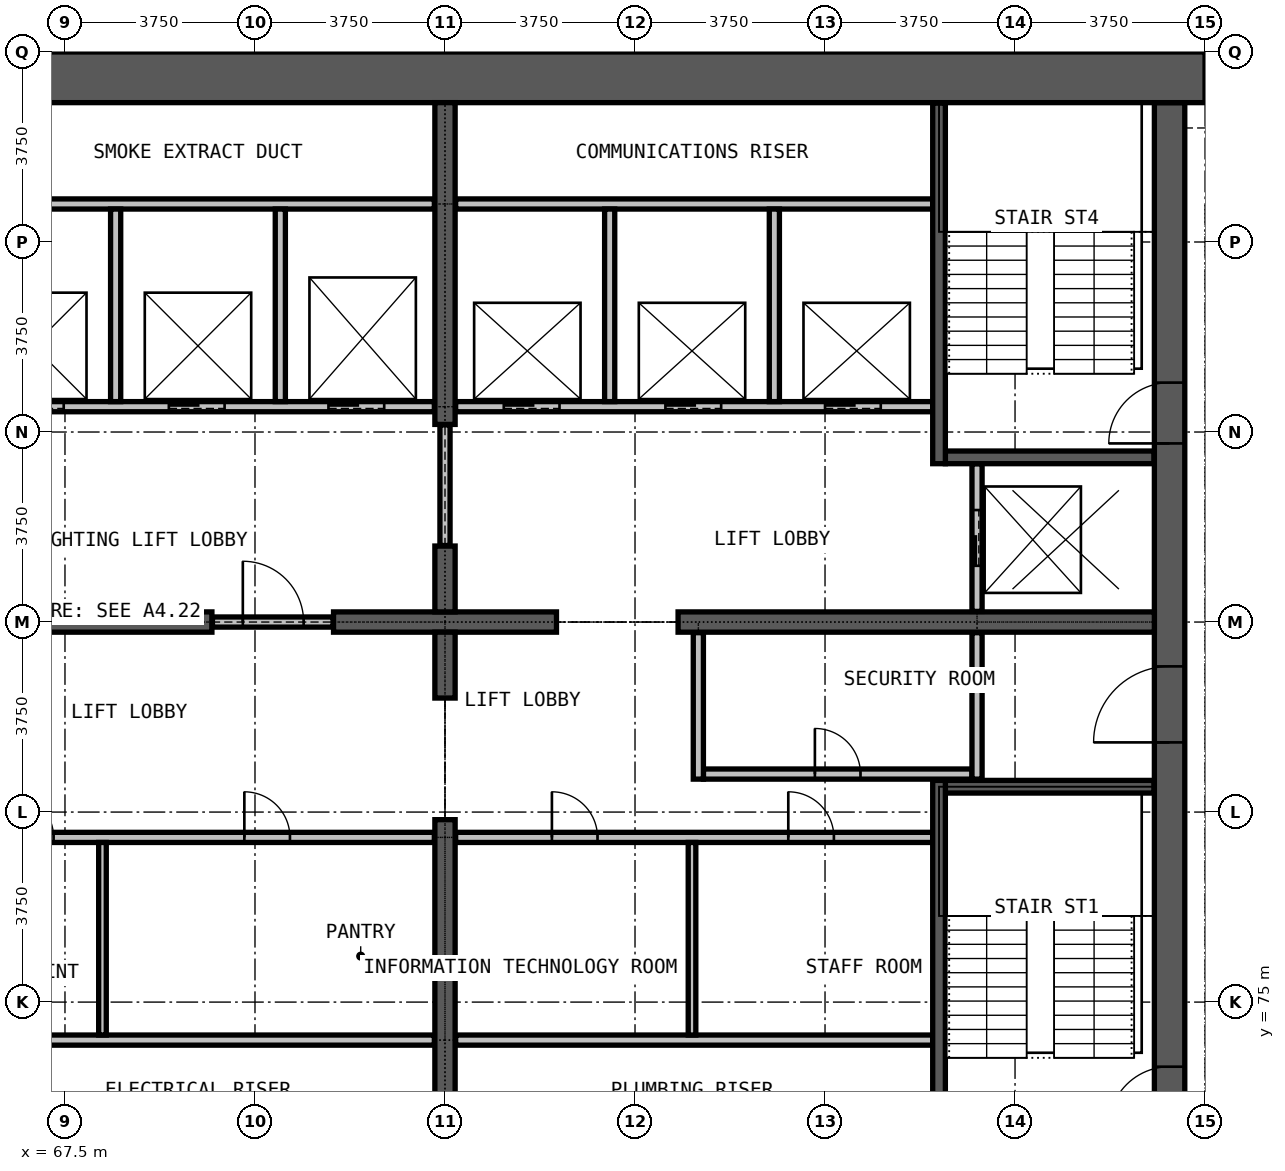
"""IFC4 building model, lengths in metres.
Left out: names, types, materials, properties, quantities, classifications, styles, units other than length and angle.
Written with IfcOpenShell. Run it as: python <this file> out.ifc"""

import sys

from ifc_helpers import new_model, si_unit, direction, frame, frame_2d, origin, place, context, subcontext, project, spatial, rectangle, extrude, element, fill, save


model = new_model("IFC4")
c1 = context("Model", 3, precision=1e-05, world=origin(), true_north=direction((0.0, 1.0)))
c2 = subcontext(c1, "Body", "Model", "MODEL_VIEW")
j1 = project(units=[si_unit("LENGTHUNIT", "METRE"), si_unit("PLANEANGLEUNIT", "RADIAN")], contexts=[c1])
p1 = place(None, origin())
s1 = spatial("IfcSite", under=j1, at=p1, CompositionType="ELEMENT")
p2 = place(p1, origin())
s2 = spatial("IfcBuilding", under=s1, at=p2, CompositionType="ELEMENT")
p3 = place(p2, frame((0.0, 0.0, 221.1)))
s3 = spatial("IfcBuildingStorey", under=s2, at=p3, CompositionType="ELEMENT", Elevation=221.1)
p4 = place(p3, frame((89.3, 72.25, 0.0), z_axis=(0.0, 0.0, 1.0), x_axis=(0.0, 1.0, 0.0)))
e1 = element("IfcWall", 1, at=p4, inside=s3, PredefinedType="SHEAR", context=c2, shape_type="SweptSolid", body=[
    extrude(rectangle(XDim=20.5, YDim=0.6, at=frame_2d((10.25, 0.0))), origin(), (0.0, 0.0, 1.0), 3.6),
])
p5 = place(p4, frame((0.275, 0.0, 0.0)))
e2 = element("IfcOpeningElement", 2, at=p5, cuts=e1, PredefinedType="OPENING", context=c2, shape_type="SweptSolid", body=[
    extrude(rectangle(XDim=1.2, YDim=2.2, at=frame_2d((0.6, 1.1))), frame((0.0, 0.31, 0.0), z_axis=(0.0, -1.0, 0.0), x_axis=(1.0, 0.0, 0.0)), (0.0, 0.0, 1.0), 0.62),
])
p6 = place(p4, frame((13.775, 0.0, 0.0)))
e3 = element("IfcOpeningElement", 3, at=p6, cuts=e1, PredefinedType="OPENING", context=c2, shape_type="SweptSolid", body=[
    extrude(rectangle(XDim=1.2, YDim=2.2, at=frame_2d((0.6, 1.1))), frame((0.0, 0.31, 0.0), z_axis=(0.0, -1.0, 0.0), x_axis=(1.0, 0.0, 0.0)), (0.0, 0.0, 1.0), 0.62),
])
p7 = place(p4, frame((7.875, 0.0, 0.0)))
e4 = element("IfcOpeningElement", 4, at=p7, cuts=e1, PredefinedType="OPENING", context=c2, shape_type="SweptSolid", body=[
    extrude(rectangle(XDim=1.5, YDim=2.2, at=frame_2d((0.75, 1.1))), frame((0.0, 0.31, 0.0), z_axis=(0.0, -1.0, 0.0), x_axis=(1.0, 0.0, 0.0)), (0.0, 0.0, 1.0), 0.62),
])
p8 = place(p3, frame((90.0, 93.25, 0.0), z_axis=(0.0, 0.0, 1.0), x_axis=(-1.0, 0.0, 0.0)))
e5 = element("IfcWall", 5, at=p8, inside=s3, PredefinedType="SHEAR", context=c2, shape_type="SweptSolid", body=[
    extrude(rectangle(XDim=30.0, YDim=1.0, at=frame_2d((15.0, 0.0))), origin(), (0.0, 0.0, 1.0), 3.6),
])
p9 = place(p3, frame((61.0, 82.5, 0.0), z_axis=(0.0, 0.0, 1.0), x_axis=(1.0, 0.0, 0.0)))
e6 = element("IfcWall", 6, at=p9, inside=s3, PredefinedType="SHEAR", context=c2, shape_type="SweptSolid", body=[
    extrude(rectangle(XDim=9.4, YDim=0.4, at=frame_2d((4.7, 0.0))), origin(), (0.0, 0.0, 1.0), 3.6),
])
p10 = place(p3, frame((72.8, 82.5, 0.0), z_axis=(0.0, 0.0, 1.0), x_axis=(1.0, 0.0, 0.0)))
e7 = element("IfcWall", 7, at=p10, inside=s3, PredefinedType="SHEAR", context=c2, shape_type="SweptSolid", body=[
    extrude(rectangle(XDim=4.4, YDim=0.4, at=frame_2d((2.2, 0.0))), origin(), (0.0, 0.0, 1.0), 3.6),
])
p11 = place(p3, frame((79.6, 82.5, 0.0), z_axis=(0.0, 0.0, 1.0), x_axis=(1.0, 0.0, 0.0)))
e8 = element("IfcWall", 8, at=p11, inside=s3, PredefinedType="SHEAR", context=c2, shape_type="SweptSolid", body=[
    extrude(rectangle(XDim=9.4, YDim=0.4, at=frame_2d((4.7, 0.0))), origin(), (0.0, 0.0, 1.0), 3.6),
])
p12 = place(p3, frame((75.0, 72.25, 0.0), z_axis=(0.0, 0.0, 1.0), x_axis=(0.0, 1.0, 0.0)))
e9 = element("IfcWall", 9, at=p12, inside=s3, PredefinedType="SHEAR", context=c2, shape_type="SweptSolid", body=[
    extrude(rectangle(XDim=6.35, YDim=0.4, at=frame_2d((3.175, 0.0))), origin(), (0.0, 0.0, 1.0), 3.6),
])
for number, where, z_axis, x_axis in (
    (10, (75.0, 81.0, 0.0), (0.0, 0.0, 1.0), (0.0, 1.0, 0.0)),
    (11, (75.0, 82.7, 0.0), (0.0, 0.0, 1.0), (0.0, 1.0, 0.0)),
):
    element("IfcWall", number, at=place(p3, frame(where, z_axis=z_axis, x_axis=x_axis)), inside=s3, PredefinedType="SHEAR", context=c2, shape_type="SweptSolid", body=[
        extrude(rectangle(XDim=1.3, YDim=0.4, at=frame_2d((0.65, 0.0))), origin(), (0.0, 0.0, 1.0), 3.6),
    ])
p13 = place(p3, frame((75.0, 86.4, 0.0), z_axis=(0.0, 0.0, 1.0), x_axis=(0.0, 1.0, 0.0)))
e12 = element("IfcWall", 12, at=p13, inside=s3, PredefinedType="SHEAR", context=c2, shape_type="SweptSolid", body=[
    extrude(rectangle(XDim=6.35, YDim=0.4, at=frame_2d((3.175, 0.0))), origin(), (0.0, 0.0, 1.0), 3.6),
])
for number, where, z_axis, x_axis in (
    (13, (65.375, 74.25, 0.0), (0.0, 0.0, 1.0), (1.0, 0.0, 0.0)),
    (14, (75.21, 74.25, 0.0), (0.0, 0.0, 1.0), (1.0, 0.0, 0.0)),
):
    element("IfcWall", number, at=place(p3, frame(where, z_axis=z_axis, x_axis=x_axis)), inside=s3, PredefinedType="PARTITIONING", context=c2, shape_type="SweptSolid", body=[
        extrude(rectangle(XDim=9.415, YDim=0.2, at=frame_2d((4.708, 0.0))), origin(), (0.0, 0.0, 1.0), 3.3),
    ])
p14 = place(p3, frame((65.375, 78.25, 0.0), z_axis=(0.0, 0.0, 1.0), x_axis=(1.0, 0.0, 0.0)))
e15 = element("IfcWall", 15, at=p14, inside=s3, PredefinedType="PARTITIONING", context=c2, shape_type="SweptSolid", body=[
    extrude(rectangle(XDim=9.415, YDim=0.2, at=frame_2d((4.708, 0.0))), origin(), (0.0, 0.0, 1.0), 3.3),
])
p15 = place(p14, frame((1.0, 0.0, 0.0)))
e16 = element("IfcOpeningElement", 16, at=p15, cuts=e15, PredefinedType="OPENING", context=c2, shape_type="SweptSolid", body=[
    extrude(rectangle(XDim=0.9, YDim=2.2, at=frame_2d((0.45, 1.1))), frame((0.0, 0.11, 0.0), z_axis=(0.0, -1.0, 0.0), x_axis=(1.0, 0.0, 0.0)), (0.0, 0.0, 1.0), 0.22),
])
p16 = place(p14, frame((5.665, 0.0, 0.0)))
e17 = element("IfcOpeningElement", 17, at=p16, cuts=e15, PredefinedType="OPENING", context=c2, shape_type="SweptSolid", body=[
    extrude(rectangle(XDim=0.9, YDim=2.2, at=frame_2d((0.45, 1.1))), frame((0.0, 0.11, 0.0), z_axis=(0.0, -1.0, 0.0), x_axis=(1.0, 0.0, 0.0)), (0.0, 0.0, 1.0), 0.22),
])
p17 = place(p3, frame((75.21, 78.25, 0.0), z_axis=(0.0, 0.0, 1.0), x_axis=(1.0, 0.0, 0.0)))
e18 = element("IfcWall", 18, at=p17, inside=s3, PredefinedType="PARTITIONING", context=c2, shape_type="SweptSolid", body=[
    extrude(rectangle(XDim=9.415, YDim=0.2, at=frame_2d((4.708, 0.0))), origin(), (0.0, 0.0, 1.0), 3.3),
])
p18 = place(p17, frame((1.9, 0.0, 0.0)))
e19 = element("IfcOpeningElement", 19, at=p18, cuts=e18, PredefinedType="OPENING", context=c2, shape_type="SweptSolid", body=[
    extrude(rectangle(XDim=0.9, YDim=2.2, at=frame_2d((0.45, 1.1))), frame((0.0, 0.11, 0.0), z_axis=(0.0, -1.0, 0.0), x_axis=(1.0, 0.0, 0.0)), (0.0, 0.0, 1.0), 0.22),
])
p19 = place(p17, frame((6.565, 0.0, 0.0)))
e20 = element("IfcOpeningElement", 20, at=p19, cuts=e18, PredefinedType="OPENING", context=c2, shape_type="SweptSolid", body=[
    extrude(rectangle(XDim=0.9, YDim=2.2, at=frame_2d((0.45, 1.1))), frame((0.0, 0.11, 0.0), z_axis=(0.0, -1.0, 0.0), x_axis=(1.0, 0.0, 0.0)), (0.0, 0.0, 1.0), 0.22),
])
p20 = place(p3, frame((80.1, 79.5, 0.0), z_axis=(0.0, 0.0, 1.0), x_axis=(1.0, 0.0, 0.0)))
e21 = element("IfcWall", 21, at=p20, inside=s3, PredefinedType="PARTITIONING", context=c2, shape_type="SweptSolid", body=[
    extrude(rectangle(XDim=5.3, YDim=0.2, at=frame_2d((2.65, 0.0))), origin(), (0.0, 0.0, 1.0), 3.3),
])
p21 = place(p20, frame((2.2, 0.0, 0.0)))
e22 = element("IfcOpeningElement", 22, at=p21, cuts=e21, PredefinedType="OPENING", context=c2, shape_type="SweptSolid", body=[
    extrude(rectangle(XDim=0.9, YDim=2.2, at=frame_2d((0.45, 1.1))), frame((0.0, 0.11, 0.0), z_axis=(0.0, -1.0, 0.0), x_axis=(1.0, 0.0, 0.0)), (0.0, 0.0, 1.0), 0.22),
])
p22 = place(p3, frame((70.41, 82.5, 0.0), z_axis=(0.0, 0.0, 1.0), x_axis=(1.0, 0.0, 0.0)))
e23 = element("IfcWall", 23, at=p22, inside=s3, PredefinedType="PARTITIONING", context=c2, shape_type="SweptSolid", body=[
    extrude(rectangle(XDim=2.38, YDim=0.2, at=frame_2d((1.19, 0.0))), origin(), (0.0, 0.0, 1.0), 2.4),
])
p23 = place(p22, frame((0.6, 0.0, 0.0)))
e24 = element("IfcOpeningElement", 24, at=p23, cuts=e23, PredefinedType="OPENING", context=c2, shape_type="SweptSolid", body=[
    extrude(rectangle(XDim=1.2, YDim=2.2, at=frame_2d((0.6, 1.1))), frame((0.0, 0.11, 0.0), z_axis=(0.0, -1.0, 0.0), x_axis=(1.0, 0.0, 0.0)), (0.0, 0.0, 1.0), 0.22),
])
p24 = place(p3, frame((75.0, 84.01, 0.0), z_axis=(0.0, 0.0, 1.0), x_axis=(0.0, 1.0, 0.0)))
e25 = element("IfcWall", 25, at=p24, inside=s3, PredefinedType="PARTITIONING", context=c2, shape_type="SweptSolid", body=[
    extrude(rectangle(XDim=2.38, YDim=0.2, at=frame_2d((1.19, 0.0))), origin(), (0.0, 0.0, 1.0), 2.4),
])
for number, where, z_axis, x_axis in (
    (26, (80.0, 79.4, 0.0), (0.0, 0.0, 1.0), (0.0, 1.0, 0.0)),
    (27, (85.5, 79.4, 0.0), (0.0, 0.0, 1.0), (0.0, 1.0, 0.0)),
):
    element("IfcWall", number, at=place(p3, frame(where, z_axis=z_axis, x_axis=x_axis)), inside=s3, PredefinedType="PARTITIONING", context=c2, shape_type="SweptSolid", body=[
        extrude(rectangle(XDim=2.89, YDim=0.2, at=frame_2d((1.445, 0.0))), origin(), (0.0, 0.0, 1.0), 3.3),
    ])
for number, where, z_axis, x_axis in (
    (28, (68.24, 74.35, 0.0), (0.0, 0.0, 1.0), (0.0, 1.0, 0.0)),
    (29, (79.875, 74.35, 0.0), (0.0, 0.0, 1.0), (0.0, 1.0, 0.0)),
):
    element("IfcWall", number, at=place(p3, frame(where, z_axis=z_axis, x_axis=x_axis)), inside=s3, PredefinedType="PARTITIONING", context=c2, shape_type="SweptSolid", body=[
        extrude(rectangle(XDim=3.8, YDim=0.15, at=frame_2d((1.9, 0.0))), origin(), (0.0, 0.0, 1.0), 3.3),
    ])
p25 = place(p3, frame((65.375, 86.75, 0.0), z_axis=(0.0, 0.0, 1.0), x_axis=(1.0, 0.0, 0.0)))
e30 = element("IfcWall", 30, at=p25, inside=s3, PredefinedType="PARTITIONING", context=c2, shape_type="SweptSolid", body=[
    extrude(rectangle(XDim=9.415, YDim=0.2, at=frame_2d((4.708, 0.0))), origin(), (0.0, 0.0, 1.0), 3.3),
])
p26 = place(p25, frame((1.0, 0.0, 0.0)))
e31 = element("IfcOpeningElement", 31, at=p26, cuts=e30, PredefinedType="OPENING", context=c2, shape_type="SweptSolid", body=[
    extrude(rectangle(XDim=1.1, YDim=2.2, at=frame_2d((0.55, 1.1))), frame((0.0, 0.11, 0.0), z_axis=(0.0, -1.0, 0.0), x_axis=(1.0, 0.0, 0.0)), (0.0, 0.0, 1.0), 0.22),
])
p27 = place(p25, frame((4.175, 0.0, 0.0)))
e32 = element("IfcOpeningElement", 32, at=p27, cuts=e30, PredefinedType="OPENING", context=c2, shape_type="SweptSolid", body=[
    extrude(rectangle(XDim=1.1, YDim=2.2, at=frame_2d((0.55, 1.1))), frame((0.0, 0.11, 0.0), z_axis=(0.0, -1.0, 0.0), x_axis=(1.0, 0.0, 0.0)), (0.0, 0.0, 1.0), 0.22),
])
p28 = place(p25, frame((7.325, 0.0, 0.0)))
e33 = element("IfcOpeningElement", 33, at=p28, cuts=e30, PredefinedType="OPENING", context=c2, shape_type="SweptSolid", body=[
    extrude(rectangle(XDim=1.1, YDim=2.2, at=frame_2d((0.55, 1.1))), frame((0.0, 0.11, 0.0), z_axis=(0.0, -1.0, 0.0), x_axis=(1.0, 0.0, 0.0)), (0.0, 0.0, 1.0), 0.22),
])
p29 = place(p3, frame((75.21, 86.75, 0.0), z_axis=(0.0, 0.0, 1.0), x_axis=(1.0, 0.0, 0.0)))
e34 = element("IfcWall", 34, at=p29, inside=s3, PredefinedType="PARTITIONING", context=c2, shape_type="SweptSolid", body=[
    extrude(rectangle(XDim=9.415, YDim=0.2, at=frame_2d((4.708, 0.0))), origin(), (0.0, 0.0, 1.0), 3.3),
])
p30 = place(p29, frame((0.95, 0.0, 0.0)))
e35 = element("IfcOpeningElement", 35, at=p30, cuts=e34, PredefinedType="OPENING", context=c2, shape_type="SweptSolid", body=[
    extrude(rectangle(XDim=1.1, YDim=2.2, at=frame_2d((0.55, 1.1))), frame((0.0, 0.11, 0.0), z_axis=(0.0, -1.0, 0.0), x_axis=(1.0, 0.0, 0.0)), (0.0, 0.0, 1.0), 0.22),
])
p31 = place(p29, frame((4.14, 0.0, 0.0)))
e36 = element("IfcOpeningElement", 36, at=p31, cuts=e34, PredefinedType="OPENING", context=c2, shape_type="SweptSolid", body=[
    extrude(rectangle(XDim=1.1, YDim=2.2, at=frame_2d((0.55, 1.1))), frame((0.0, 0.11, 0.0), z_axis=(0.0, -1.0, 0.0), x_axis=(1.0, 0.0, 0.0)), (0.0, 0.0, 1.0), 0.22),
])
p32 = place(p29, frame((7.29, 0.0, 0.0)))
e37 = element("IfcOpeningElement", 37, at=p32, cuts=e34, PredefinedType="OPENING", context=c2, shape_type="SweptSolid", body=[
    extrude(rectangle(XDim=1.1, YDim=2.2, at=frame_2d((0.55, 1.1))), frame((0.0, 0.11, 0.0), z_axis=(0.0, -1.0, 0.0), x_axis=(1.0, 0.0, 0.0)), (0.0, 0.0, 1.0), 0.22),
])
for number, where, z_axis, x_axis in (
    (38, (65.375, 90.75, 0.0), (0.0, 0.0, 1.0), (1.0, 0.0, 0.0)),
    (39, (75.21, 90.75, 0.0), (0.0, 0.0, 1.0), (1.0, 0.0, 0.0)),
):
    element("IfcWall", number, at=place(p3, frame(where, z_axis=z_axis, x_axis=x_axis)), inside=s3, PredefinedType="PARTITIONING", context=c2, shape_type="SweptSolid", body=[
        extrude(rectangle(XDim=9.415, YDim=0.2, at=frame_2d((4.708, 0.0))), origin(), (0.0, 0.0, 1.0), 3.3),
    ])
for number, where, z_axis, x_axis in (
    (40, (68.5, 86.85, 0.0), (0.0, 0.0, 1.0), (0.0, 1.0, 0.0)),
    (41, (71.75, 86.85, 0.0), (0.0, 0.0, 1.0), (0.0, 1.0, 0.0)),
    (42, (78.25, 86.85, 0.0), (0.0, 0.0, 1.0), (0.0, 1.0, 0.0)),
    (43, (81.5, 86.85, 0.0), (0.0, 0.0, 1.0), (0.0, 1.0, 0.0)),
):
    element("IfcWall", number, at=place(p3, frame(where, z_axis=z_axis, x_axis=x_axis)), inside=s3, PredefinedType="PARTITIONING", context=c2, shape_type="SweptSolid", body=[
        extrude(rectangle(XDim=3.8, YDim=0.2, at=frame_2d((1.9, 0.0))), origin(), (0.0, 0.0, 1.0), 3.3),
    ])
p33 = place(p3, frame((85.5, 82.71, 0.0), z_axis=(0.0, 0.0, 1.0), x_axis=(0.0, 1.0, 0.0)))
e44 = element("IfcWall", 44, at=p33, inside=s3, PredefinedType="PARTITIONING", context=c2, shape_type="SweptSolid", body=[
    extrude(rectangle(XDim=2.915, YDim=0.2, at=frame_2d((1.458, 0.0))), origin(), (0.0, 0.0, 1.0), 3.3),
])
p34 = place(p33, frame((0.9, 0.0, 0.0)))
e45 = element("IfcOpeningElement", 45, at=p34, cuts=e44, PredefinedType="OPENING", context=c2, shape_type="SweptSolid", body=[
    extrude(rectangle(XDim=1.1, YDim=2.2, at=frame_2d((0.55, 1.1))), frame((0.0, 0.11, 0.0), z_axis=(0.0, -1.0, 0.0), x_axis=(1.0, 0.0, 0.0)), (0.0, 0.0, 1.0), 0.22),
])
for number, where, z_axis, x_axis in (
    (46, (84.875, 79.25, 0.0), (0.0, 0.0, 1.0), (1.0, 0.0, 0.0)),
    (47, (84.875, 85.75, 0.0), (0.0, 0.0, 1.0), (1.0, 0.0, 0.0)),
):
    element("IfcWall", number, at=place(p3, frame(where, z_axis=z_axis, x_axis=x_axis)), inside=s3, PredefinedType="PARTITIONING", context=c2, shape_type="SweptSolid", body=[
        extrude(rectangle(XDim=4.115, YDim=0.25, at=frame_2d((2.058, 0.0))), origin(), (0.0, 0.0, 1.0), 3.3),
    ])
for number, where, z_axis, x_axis in (
    (48, (84.75, 72.26, 0.0), (0.0, 0.0, 1.0), (0.0, 1.0, 0.0)),
    (49, (84.75, 85.625, 0.0), (0.0, 0.0, 1.0), (0.0, 1.0, 0.0)),
):
    element("IfcWall", number, at=place(p3, frame(where, z_axis=z_axis, x_axis=x_axis)), inside=s3, PredefinedType="PARTITIONING", context=c2, shape_type="SweptSolid", body=[
        extrude(rectangle(XDim=7.115, YDim=0.25, at=frame_2d((3.558, 0.0))), origin(), (0.0, 0.0, 1.0), 3.3),
    ])
p35 = place(p30, origin())
e50 = element("IfcDoor", 50, at=p35, inside=s3, OperationType="DOUBLE_DOOR_SLIDING", PredefinedType="DOOR", context=c2, shape_type="SweptSolid", body=[
    extrude(rectangle(XDim=1.1, YDim=2.2, at=frame_2d((0.55, 1.1))), frame((0.0, 0.025, 0.0), z_axis=(0.0, -1.0, 0.0), x_axis=(1.0, 0.0, 0.0)), (0.0, 0.0, 1.0), 0.05),
])
fill(e35, e50)
p36 = place(p31, origin())
e51 = element("IfcDoor", 51, at=p36, inside=s3, OperationType="DOUBLE_DOOR_SLIDING", PredefinedType="DOOR", context=c2, shape_type="SweptSolid", body=[
    extrude(rectangle(XDim=1.1, YDim=2.2, at=frame_2d((0.55, 1.1))), frame((0.0, 0.025, 0.0), z_axis=(0.0, -1.0, 0.0), x_axis=(1.0, 0.0, 0.0)), (0.0, 0.0, 1.0), 0.05),
])
fill(e36, e51)
p37 = place(p32, origin())
e52 = element("IfcDoor", 52, at=p37, inside=s3, OperationType="DOUBLE_DOOR_SLIDING", PredefinedType="DOOR", context=c2, shape_type="SweptSolid", body=[
    extrude(rectangle(XDim=1.1, YDim=2.2, at=frame_2d((0.55, 1.1))), frame((0.0, 0.025, 0.0), z_axis=(0.0, -1.0, 0.0), x_axis=(1.0, 0.0, 0.0)), (0.0, 0.0, 1.0), 0.05),
])
fill(e37, e52)
p38 = place(p26, origin())
e53 = element("IfcDoor", 53, at=p38, inside=s3, OperationType="DOUBLE_DOOR_SLIDING", PredefinedType="DOOR", context=c2, shape_type="SweptSolid", body=[
    extrude(rectangle(XDim=1.1, YDim=2.2, at=frame_2d((0.55, 1.1))), frame((0.0, 0.025, 0.0), z_axis=(0.0, -1.0, 0.0), x_axis=(1.0, 0.0, 0.0)), (0.0, 0.0, 1.0), 0.05),
])
fill(e31, e53)
p39 = place(p27, origin())
e54 = element("IfcDoor", 54, at=p39, inside=s3, OperationType="DOUBLE_DOOR_SLIDING", PredefinedType="DOOR", context=c2, shape_type="SweptSolid", body=[
    extrude(rectangle(XDim=1.1, YDim=2.2, at=frame_2d((0.55, 1.1))), frame((0.0, 0.025, 0.0), z_axis=(0.0, -1.0, 0.0), x_axis=(1.0, 0.0, 0.0)), (0.0, 0.0, 1.0), 0.05),
])
fill(e32, e54)
p40 = place(p28, origin())
e55 = element("IfcDoor", 55, at=p40, inside=s3, OperationType="DOUBLE_DOOR_SLIDING", PredefinedType="DOOR", context=c2, shape_type="SweptSolid", body=[
    extrude(rectangle(XDim=1.1, YDim=2.2, at=frame_2d((0.55, 1.1))), frame((0.0, 0.025, 0.0), z_axis=(0.0, -1.0, 0.0), x_axis=(1.0, 0.0, 0.0)), (0.0, 0.0, 1.0), 0.05),
])
fill(e33, e55)
p41 = place(p34, origin())
e56 = element("IfcDoor", 56, at=p41, inside=s3, OperationType="DOUBLE_DOOR_SLIDING", PredefinedType="DOOR", context=c2, shape_type="SweptSolid", body=[
    extrude(rectangle(XDim=1.1, YDim=2.2, at=frame_2d((0.55, 1.1))), frame((0.0, 0.025, 0.0), z_axis=(0.0, -1.0, 0.0), x_axis=(1.0, 0.0, 0.0)), (0.0, 0.0, 1.0), 0.05),
])
fill(e45, e56)
p42 = place(p23, origin())
e57 = element("IfcDoor", 57, at=p42, inside=s3, OperationType="SINGLE_SWING_LEFT", PredefinedType="DOOR", context=c2, shape_type="SweptSolid", body=[
    extrude(rectangle(XDim=1.2, YDim=2.2, at=frame_2d((0.6, 1.1))), frame((0.0, 0.025, 0.0), z_axis=(0.0, -1.0, 0.0), x_axis=(1.0, 0.0, 0.0)), (0.0, 0.0, 1.0), 0.05),
])
fill(e24, e57)
p43 = place(p5, origin())
e58 = element("IfcDoor", 58, at=p43, inside=s3, OperationType="SINGLE_SWING_RIGHT", PredefinedType="DOOR", context=c2, shape_type="SweptSolid", body=[
    extrude(rectangle(XDim=1.2, YDim=2.2, at=frame_2d((0.6, 1.1))), frame((0.0, 0.025, 0.0), z_axis=(0.0, -1.0, 0.0), x_axis=(1.0, 0.0, 0.0)), (0.0, 0.0, 1.0), 0.05),
])
fill(e2, e58)
p44 = place(p6, origin())
e59 = element("IfcDoor", 59, at=p44, inside=s3, OperationType="SINGLE_SWING_LEFT", PredefinedType="DOOR", context=c2, shape_type="SweptSolid", body=[
    extrude(rectangle(XDim=1.2, YDim=2.2, at=frame_2d((0.6, 1.1))), frame((0.0, 0.025, 0.0), z_axis=(0.0, -1.0, 0.0), x_axis=(1.0, 0.0, 0.0)), (0.0, 0.0, 1.0), 0.05),
])
fill(e3, e59)
p45 = place(p7, origin())
e60 = element("IfcDoor", 60, at=p45, inside=s3, OperationType="DOUBLE_DOOR_SINGLE_SWING", PredefinedType="DOOR", context=c2, shape_type="SweptSolid", body=[
    extrude(rectangle(XDim=1.5, YDim=2.2, at=frame_2d((0.75, 1.1))), frame((0.0, 0.025, 0.0), z_axis=(0.0, -1.0, 0.0), x_axis=(1.0, 0.0, 0.0)), (0.0, 0.0, 1.0), 0.05),
])
fill(e4, e60)
p46 = place(p21, origin())
e61 = element("IfcDoor", 61, at=p46, inside=s3, OperationType="SINGLE_SWING_LEFT", PredefinedType="DOOR", context=c2, shape_type="SweptSolid", body=[
    extrude(rectangle(XDim=0.9, YDim=2.2, at=frame_2d((0.45, 1.1))), frame((0.0, 0.025, 0.0), z_axis=(0.0, -1.0, 0.0), x_axis=(1.0, 0.0, 0.0)), (0.0, 0.0, 1.0), 0.05),
])
fill(e22, e61)
p47 = place(p15, origin())
e62 = element("IfcDoor", 62, at=p47, inside=s3, OperationType="SINGLE_SWING_LEFT", PredefinedType="DOOR", context=c2, shape_type="SweptSolid", body=[
    extrude(rectangle(XDim=0.9, YDim=2.2, at=frame_2d((0.45, 1.1))), frame((0.0, 0.025, 0.0), z_axis=(0.0, -1.0, 0.0), x_axis=(1.0, 0.0, 0.0)), (0.0, 0.0, 1.0), 0.05),
])
fill(e16, e62)
p48 = place(p16, origin())
e63 = element("IfcDoor", 63, at=p48, inside=s3, OperationType="SINGLE_SWING_LEFT", PredefinedType="DOOR", context=c2, shape_type="SweptSolid", body=[
    extrude(rectangle(XDim=0.9, YDim=2.2, at=frame_2d((0.45, 1.1))), frame((0.0, 0.025, 0.0), z_axis=(0.0, -1.0, 0.0), x_axis=(1.0, 0.0, 0.0)), (0.0, 0.0, 1.0), 0.05),
])
fill(e17, e63)
p49 = place(p18, origin())
e64 = element("IfcDoor", 64, at=p49, inside=s3, OperationType="SINGLE_SWING_RIGHT", PredefinedType="DOOR", context=c2, shape_type="SweptSolid", body=[
    extrude(rectangle(XDim=0.9, YDim=2.2, at=frame_2d((0.45, 1.1))), frame((0.0, 0.025, 0.0), z_axis=(0.0, -1.0, 0.0), x_axis=(1.0, 0.0, 0.0)), (0.0, 0.0, 1.0), 0.05),
])
fill(e19, e64)
p50 = place(p19, origin())
e65 = element("IfcDoor", 65, at=p50, inside=s3, OperationType="SINGLE_SWING_LEFT", PredefinedType="DOOR", context=c2, shape_type="SweptSolid", body=[
    extrude(rectangle(XDim=0.9, YDim=2.2, at=frame_2d((0.45, 1.1))), frame((0.0, 0.025, 0.0), z_axis=(0.0, -1.0, 0.0), x_axis=(1.0, 0.0, 0.0)), (0.0, 0.0, 1.0), 0.05),
])
fill(e20, e65)
save(model, sys.argv[1])
